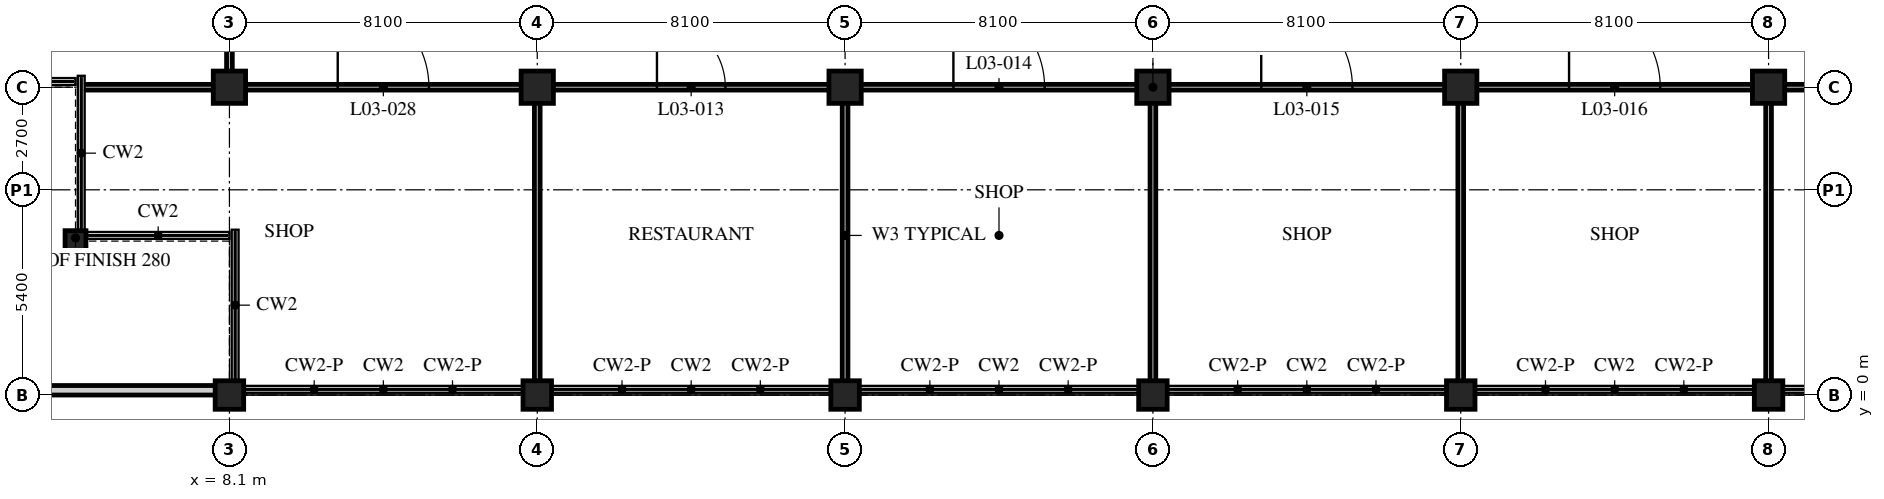
"""IFC4 building model, lengths in metres.
Left out: names, types, materials, properties, quantities, classifications, styles, units other than length and angle.
Written with IfcOpenShell. Run it as: python <this file> out.ifc"""

import sys

from ifc_helpers import new_model, si_unit, direction, frame, frame_2d, origin, origin_2d, place, context, subcontext, project, spatial, rectangle, hollow_rectangle, extrude, element, fill, save


model = new_model("IFC4")
c1 = context("Model", 3, precision=1e-05, world=origin(), true_north=direction((0.0, 1.0)))
c2 = subcontext(c1, "Body", "Model", "MODEL_VIEW")
j1 = project(units=[si_unit("LENGTHUNIT", "METRE"), si_unit("PLANEANGLEUNIT", "RADIAN")], contexts=[c1])
p1 = place(None, origin())
s1 = spatial("IfcSite", under=j1, at=p1, CompositionType="ELEMENT")
p2 = place(p1, origin())
s2 = spatial("IfcBuilding", under=s1, at=p2, CompositionType="ELEMENT")
p3 = place(p2, frame((0.0, 0.0, 16.8)))
s3 = spatial("IfcBuildingStorey", under=s2, at=p3, CompositionType="ELEMENT", Elevation=16.8)
p4 = place(p3, frame((4.05, 4.05, 0.0), z_axis=(0.0, 0.0, 1.0), x_axis=(1.0, 0.0, 0.0)))
e1 = element("IfcColumn", 1, at=p4, inside=s3, PredefinedType="COLUMN", context=c2, shape_type="SweptSolid", body=[
    extrude(hollow_rectangle(XDim=0.55, YDim=0.55, WallThickness=0.05, at=origin_2d()), origin(), (0.0, 0.0, 1.0), 5.4),
])
p5 = place(p3, frame((8.1, 0.0, 0.0), z_axis=(0.0, 0.0, 1.0), x_axis=(1.0, 0.0, 0.0)))
e2 = element("IfcColumn", 2, at=p5, inside=s3, PredefinedType="COLUMN", context=c2, shape_type="SweptSolid", body=[
    extrude(hollow_rectangle(XDim=0.75, YDim=0.75, WallThickness=0.07, at=origin_2d()), origin(), (0.0, 0.0, 1.0), 5.4),
])
p6 = place(p3, frame((8.1, 8.1, 0.0), z_axis=(0.0, 0.0, 1.0), x_axis=(1.0, 0.0, 0.0)))
e3 = element("IfcColumn", 3, at=p6, inside=s3, PredefinedType="COLUMN", context=c2, shape_type="SweptSolid", body=[
    extrude(hollow_rectangle(XDim=0.85, YDim=0.85, WallThickness=0.085, at=origin_2d()), origin(), (0.0, 0.0, 1.0), 5.4),
])
p7 = place(p3, frame((16.2, 0.0, 0.0), z_axis=(0.0, 0.0, 1.0), x_axis=(1.0, 0.0, 0.0)))
e4 = element("IfcColumn", 4, at=p7, inside=s3, PredefinedType="COLUMN", context=c2, shape_type="SweptSolid", body=[
    extrude(hollow_rectangle(XDim=0.75, YDim=0.75, WallThickness=0.07, at=origin_2d()), origin(), (0.0, 0.0, 1.0), 5.4),
])
p8 = place(p3, frame((16.2, 8.1, 0.0), z_axis=(0.0, 0.0, 1.0), x_axis=(1.0, 0.0, 0.0)))
e5 = element("IfcColumn", 5, at=p8, inside=s3, PredefinedType="COLUMN", context=c2, shape_type="SweptSolid", body=[
    extrude(hollow_rectangle(XDim=0.85, YDim=0.85, WallThickness=0.085, at=origin_2d()), origin(), (0.0, 0.0, 1.0), 5.4),
])
p9 = place(p3, frame((24.3, 0.0, 0.0), z_axis=(0.0, 0.0, 1.0), x_axis=(1.0, 0.0, 0.0)))
e6 = element("IfcColumn", 6, at=p9, inside=s3, PredefinedType="COLUMN", context=c2, shape_type="SweptSolid", body=[
    extrude(hollow_rectangle(XDim=0.75, YDim=0.75, WallThickness=0.07, at=origin_2d()), origin(), (0.0, 0.0, 1.0), 5.4),
])
p10 = place(p3, frame((24.3, 8.1, 0.0), z_axis=(0.0, 0.0, 1.0), x_axis=(1.0, 0.0, 0.0)))
e7 = element("IfcColumn", 7, at=p10, inside=s3, PredefinedType="COLUMN", context=c2, shape_type="SweptSolid", body=[
    extrude(hollow_rectangle(XDim=0.85, YDim=0.85, WallThickness=0.085, at=origin_2d()), origin(), (0.0, 0.0, 1.0), 5.4),
])
p11 = place(p3, frame((32.4, 0.0, 0.0), z_axis=(0.0, 0.0, 1.0), x_axis=(1.0, 0.0, 0.0)))
e8 = element("IfcColumn", 8, at=p11, inside=s3, PredefinedType="COLUMN", context=c2, shape_type="SweptSolid", body=[
    extrude(hollow_rectangle(XDim=0.75, YDim=0.75, WallThickness=0.07, at=origin_2d()), origin(), (0.0, 0.0, 1.0), 5.4),
])
p12 = place(p3, frame((32.4, 8.1, 0.0), z_axis=(0.0, 0.0, 1.0), x_axis=(1.0, 0.0, 0.0)))
e9 = element("IfcColumn", 9, at=p12, inside=s3, PredefinedType="COLUMN", context=c2, shape_type="SweptSolid", body=[
    extrude(hollow_rectangle(XDim=0.85, YDim=0.85, WallThickness=0.085, at=origin_2d()), origin(), (0.0, 0.0, 1.0), 5.4),
])
p13 = place(p3, frame((40.5, 0.0, 0.0), z_axis=(0.0, 0.0, 1.0), x_axis=(1.0, 0.0, 0.0)))
e10 = element("IfcColumn", 10, at=p13, inside=s3, PredefinedType="COLUMN", context=c2, shape_type="SweptSolid", body=[
    extrude(hollow_rectangle(XDim=0.75, YDim=0.75, WallThickness=0.07, at=origin_2d()), origin(), (0.0, 0.0, 1.0), 5.4),
])
p14 = place(p3, frame((40.5, 8.1, 0.0), z_axis=(0.0, 0.0, 1.0), x_axis=(1.0, 0.0, 0.0)))
e11 = element("IfcColumn", 11, at=p14, inside=s3, PredefinedType="COLUMN", context=c2, shape_type="SweptSolid", body=[
    extrude(hollow_rectangle(XDim=0.85, YDim=0.85, WallThickness=0.085, at=origin_2d()), origin(), (0.0, 0.0, 1.0), 5.4),
])
p15 = place(p3, frame((48.6, 0.0, 0.0), z_axis=(0.0, 0.0, 1.0), x_axis=(1.0, 0.0, 0.0)))
e12 = element("IfcColumn", 12, at=p15, inside=s3, PredefinedType="COLUMN", context=c2, shape_type="SweptSolid", body=[
    extrude(hollow_rectangle(XDim=0.75, YDim=0.75, WallThickness=0.07, at=origin_2d()), origin(), (0.0, 0.0, 1.0), 5.4),
])
p16 = place(p3, frame((48.6, 8.1, 0.0), z_axis=(0.0, 0.0, 1.0), x_axis=(1.0, 0.0, 0.0)))
e13 = element("IfcColumn", 13, at=p16, inside=s3, PredefinedType="COLUMN", context=c2, shape_type="SweptSolid", body=[
    extrude(hollow_rectangle(XDim=0.85, YDim=0.85, WallThickness=0.085, at=origin_2d()), origin(), (0.0, 0.0, 1.0), 5.4),
])
p17 = place(p3, frame((-7.85, 0.125, 0.0), z_axis=(0.0, 0.0, 1.0), x_axis=(1.0, 0.0, 0.0)))
e14 = element("IfcWall", 14, at=p17, inside=s3, PredefinedType="PARAPET", context=c2, shape_type="SweptSolid", body=[
    extrude(rectangle(XDim=15.95, YDim=0.25, at=frame_2d((7.975, 0.0))), origin(), (0.0, 0.0, 1.0), 1.38),
])
p18 = place(p3, frame((8.1, 8.1, 0.0), z_axis=(0.0, 0.0, 1.0), x_axis=(1.0, 0.0, 0.0)))
e15 = element("IfcWall", 15, at=p18, inside=s3, PredefinedType="PARTITIONING", context=c2, shape_type="SweptSolid", body=[
    extrude(rectangle(XDim=48.6, YDim=0.15, at=frame_2d((24.3, 0.0))), origin(), (0.0, 0.0, 1.0), 4.538),
])
p19 = place(p18, frame((11.25, 0.0, 0.0)))
e16 = element("IfcOpeningElement", 16, at=p19, cuts=e15, PredefinedType="OPENING", context=c2, shape_type="SweptSolid", body=[
    extrude(rectangle(XDim=1.8, YDim=2.4, at=frame_2d((0.9, 1.2))), frame((0.0, 0.085, 0.0), z_axis=(0.0, -1.0, 0.0), x_axis=(1.0, 0.0, 0.0)), (0.0, 0.0, 1.0), 0.17),
])
p20 = place(p18, frame((19.05, 0.0, 0.0)))
e17 = element("IfcOpeningElement", 17, at=p20, cuts=e15, PredefinedType="OPENING", context=c2, shape_type="SweptSolid", body=[
    extrude(rectangle(XDim=2.4, YDim=2.7, at=frame_2d((1.2, 1.35))), frame((0.0, 0.085, 0.0), z_axis=(0.0, -1.0, 0.0), x_axis=(1.0, 0.0, 0.0)), (0.0, 0.0, 1.0), 0.17),
])
p21 = place(p18, frame((27.15, 0.0, 0.0)))
e18 = element("IfcOpeningElement", 18, at=p21, cuts=e15, PredefinedType="OPENING", context=c2, shape_type="SweptSolid", body=[
    extrude(rectangle(XDim=2.4, YDim=2.7, at=frame_2d((1.2, 1.35))), frame((0.0, 0.085, 0.0), z_axis=(0.0, -1.0, 0.0), x_axis=(1.0, 0.0, 0.0)), (0.0, 0.0, 1.0), 0.17),
])
p22 = place(p18, frame((35.25, 0.0, 0.0)))
e19 = element("IfcOpeningElement", 19, at=p22, cuts=e15, PredefinedType="OPENING", context=c2, shape_type="SweptSolid", body=[
    extrude(rectangle(XDim=2.4, YDim=2.7, at=frame_2d((1.2, 1.35))), frame((0.0, 0.085, 0.0), z_axis=(0.0, -1.0, 0.0), x_axis=(1.0, 0.0, 0.0)), (0.0, 0.0, 1.0), 0.17),
])
p23 = place(p18, frame((2.85, 0.0, 0.0)))
e20 = element("IfcOpeningElement", 20, at=p23, cuts=e15, PredefinedType="OPENING", context=c2, shape_type="SweptSolid", body=[
    extrude(rectangle(XDim=2.4, YDim=2.7, at=frame_2d((1.2, 1.35))), frame((0.0, 0.085, 0.0), z_axis=(0.0, -1.0, 0.0), x_axis=(1.0, 0.0, 0.0)), (0.0, 0.0, 1.0), 0.17),
])
p24 = place(p18, frame((43.35, 0.0, 0.0)))
e21 = element("IfcOpeningElement", 21, at=p24, cuts=e15, PredefinedType="OPENING", context=c2, shape_type="SweptSolid", body=[
    extrude(rectangle(XDim=2.4, YDim=2.7, at=frame_2d((1.2, 1.35))), frame((0.0, 0.085, 0.0), z_axis=(0.0, -1.0, 0.0), x_axis=(1.0, 0.0, 0.0)), (0.0, 0.0, 1.0), 0.17),
])
p25 = place(p3, frame((8.1, 8.1, 0.0), z_axis=(0.0, 0.0, 1.0), x_axis=(0.0, 1.0, 0.0)))
e22 = element("IfcWall", 22, at=p25, inside=s3, PredefinedType="PARTITIONING", context=c2, shape_type="SweptSolid", body=[
    extrude(rectangle(XDim=34.35, YDim=0.15, at=frame_2d((17.175, 0.0))), origin(), (0.0, 0.0, 1.0), 4.538),
])
p26 = place(p25, frame((8.95, 0.0, 0.0)))
e23 = element("IfcOpeningElement", 23, at=p26, cuts=e22, PredefinedType="OPENING", context=c2, shape_type="SweptSolid", body=[
    extrude(rectangle(XDim=1.8, YDim=2.4, at=frame_2d((0.9, 1.2))), frame((0.0, 0.085, 0.0), z_axis=(0.0, -1.0, 0.0), x_axis=(1.0, 0.0, 0.0)), (0.0, 0.0, 1.0), 0.17),
])
p27 = place(p25, frame((19.35, 0.0, 0.0)))
e24 = element("IfcOpeningElement", 24, at=p27, cuts=e22, PredefinedType="OPENING", context=c2, shape_type="SweptSolid", body=[
    extrude(rectangle(XDim=1.8, YDim=2.4, at=frame_2d((0.9, 1.2))), frame((0.0, 0.085, 0.0), z_axis=(0.0, -1.0, 0.0), x_axis=(1.0, 0.0, 0.0)), (0.0, 0.0, 1.0), 0.17),
])
p28 = place(p25, frame((27.15, 0.0, 0.0)))
e25 = element("IfcOpeningElement", 25, at=p28, cuts=e22, PredefinedType="OPENING", context=c2, shape_type="SweptSolid", body=[
    extrude(rectangle(XDim=2.4, YDim=2.7, at=frame_2d((1.2, 1.35))), frame((0.0, 0.085, 0.0), z_axis=(0.0, -1.0, 0.0), x_axis=(1.0, 0.0, 0.0)), (0.0, 0.0, 1.0), 0.17),
])
for number, where, z_axis, x_axis in (
    (26, (24.3, 8.1, 0.0), (0.0, 0.0, 1.0), (0.0, -1.0, 0.0)),
    (27, (32.4, 8.1, 0.0), (0.0, 0.0, 1.0), (0.0, -1.0, 0.0)),
    (28, (40.5, 8.1, 0.0), (0.0, 0.0, 1.0), (0.0, -1.0, 0.0)),
):
    element("IfcWall", number, at=place(p3, frame(where, z_axis=z_axis, x_axis=x_axis)), inside=s3, PredefinedType="PARTITIONING", context=c2, shape_type="SweptSolid", body=[
        extrude(rectangle(XDim=7.8, YDim=0.15, at=frame_2d((3.9, 0.0))), origin(), (0.0, 0.0, 1.0), 4.538),
    ])
p29 = place(p3, frame((4.218, 8.1, 0.0), z_axis=(0.0, 0.0, 1.0), x_axis=(1.0, 0.0, 0.0)))
e29 = element("IfcWall", 29, at=p29, inside=s3, PredefinedType="PARTITIONING", context=c2, shape_type="SweptSolid", body=[
    extrude(rectangle(XDim=3.882, YDim=0.15, at=frame_2d((1.941, 0.0))), origin(), (0.0, 0.0, 1.0), 4.538),
])
for number, where, z_axis, x_axis in (
    (30, (16.2, 8.1, 0.0), (0.0, 0.0, 1.0), (0.0, -1.0, 0.0)),
    (31, (48.6, 8.1, 0.0), (0.0, 0.0, 1.0), (0.0, -1.0, 0.0)),
):
    element("IfcWall", number, at=place(p3, frame(where, z_axis=z_axis, x_axis=x_axis)), inside=s3, PredefinedType="PARTITIONING", context=c2, shape_type="SweptSolid", body=[
        extrude(rectangle(XDim=7.8, YDim=0.15, at=frame_2d((3.9, 0.0))), origin(), (0.0, 0.0, 1.0), 4.538),
    ])
p30 = place(p19, origin())
e32 = element("IfcDoor", 32, at=p30, inside=s3, OperationType="DOUBLE_DOOR_SINGLE_SWING", PredefinedType="DOOR", context=c2, shape_type="SweptSolid", body=[
    extrude(rectangle(XDim=1.8, YDim=2.4, at=frame_2d((0.9, 1.2))), frame((0.0, 0.025, 0.0), z_axis=(0.0, -1.0, 0.0), x_axis=(1.0, 0.0, 0.0)), (0.0, 0.0, 1.0), 0.05),
])
fill(e16, e32)
p31 = place(p20, origin())
e33 = element("IfcDoor", 33, at=p31, inside=s3, OperationType="DOUBLE_DOOR_SINGLE_SWING", PredefinedType="DOOR", context=c2, shape_type="SweptSolid", body=[
    extrude(rectangle(XDim=2.4, YDim=2.7, at=frame_2d((1.2, 1.35))), frame((0.0, 0.025, 0.0), z_axis=(0.0, -1.0, 0.0), x_axis=(1.0, 0.0, 0.0)), (0.0, 0.0, 1.0), 0.05),
])
fill(e17, e33)
p32 = place(p21, origin())
e34 = element("IfcDoor", 34, at=p32, inside=s3, OperationType="DOUBLE_DOOR_SINGLE_SWING", PredefinedType="DOOR", context=c2, shape_type="SweptSolid", body=[
    extrude(rectangle(XDim=2.4, YDim=2.7, at=frame_2d((1.2, 1.35))), frame((0.0, 0.025, 0.0), z_axis=(0.0, -1.0, 0.0), x_axis=(1.0, 0.0, 0.0)), (0.0, 0.0, 1.0), 0.05),
])
fill(e18, e34)
p33 = place(p22, origin())
e35 = element("IfcDoor", 35, at=p33, inside=s3, OperationType="DOUBLE_DOOR_SINGLE_SWING", PredefinedType="DOOR", context=c2, shape_type="SweptSolid", body=[
    extrude(rectangle(XDim=2.4, YDim=2.7, at=frame_2d((1.2, 1.35))), frame((0.0, 0.025, 0.0), z_axis=(0.0, -1.0, 0.0), x_axis=(1.0, 0.0, 0.0)), (0.0, 0.0, 1.0), 0.05),
])
fill(e19, e35)
p34 = place(p23, origin())
e36 = element("IfcDoor", 36, at=p34, inside=s3, OperationType="DOUBLE_DOOR_SINGLE_SWING", PredefinedType="DOOR", context=c2, shape_type="SweptSolid", body=[
    extrude(rectangle(XDim=2.4, YDim=2.7, at=frame_2d((1.2, 1.35))), frame((0.0, 0.025, 0.0), z_axis=(0.0, -1.0, 0.0), x_axis=(1.0, 0.0, 0.0)), (0.0, 0.0, 1.0), 0.05),
])
fill(e20, e36)
save(model, sys.argv[1])
